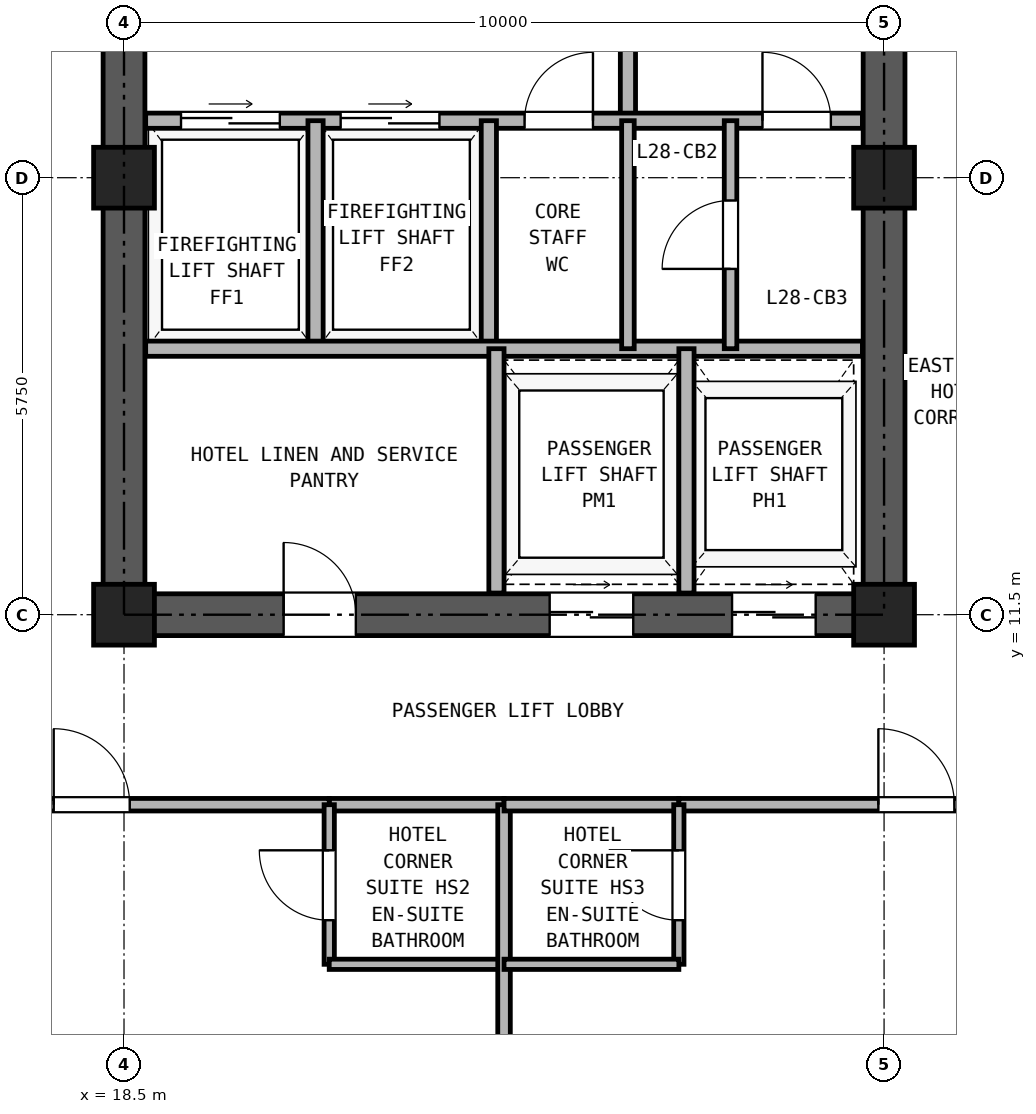
"""IFC4 building model, lengths in metres.
Left out: names, types, materials, properties, quantities, classifications, styles, units other than length and angle.
Written with IfcOpenShell. Run it as: python <this file> out.ifc"""

import sys

from ifc_helpers import new_model, si_unit, direction, frame, frame_2d, origin, origin_2d, place, context, subcontext, project, spatial, rectangle, hollow_rectangle, extrude, source, transform, mapped, element, fill, save


model = new_model("IFC4")
c1 = context("Model", 3, precision=1e-05, world=origin(), true_north=direction((0.0, 1.0)))
c2 = subcontext(c1, "Body", "Model", "MODEL_VIEW")
j1 = project(units=[si_unit("LENGTHUNIT", "METRE"), si_unit("PLANEANGLEUNIT", "RADIAN")], contexts=[c1])
p1 = place(None, origin())
s1 = spatial("IfcSite", under=j1, at=p1, CompositionType="ELEMENT")
p2 = place(p1, origin())
s2 = spatial("IfcBuilding", under=s1, at=p2, CompositionType="ELEMENT")
p3 = place(p2, frame((0.0, 0.0, 105.5)))
s3 = spatial("IfcBuildingStorey", under=s2, at=p3, CompositionType="ELEMENT", Elevation=105.5)
m1 = source(origin(), c2, "Body", "SweptSolid", [
    extrude(hollow_rectangle(XDim=0.8, YDim=0.8, WallThickness=0.045, at=origin_2d()), origin(), (0.0, 0.0, 1.0), 2.95),
])
for number, where, z_axis, x_axis in (
    (1, (18.5, 11.5, 0.0), (0.0, 0.0, 1.0), (1.0, 0.0, 0.0)),
    (2, (18.5, 17.25, 0.0), (0.0, 0.0, 1.0), (1.0, 0.0, 0.0)),
    (3, (28.5, 11.5, 0.0), (0.0, 0.0, 1.0), (1.0, 0.0, 0.0)),
    (4, (28.5, 17.25, 0.0), (0.0, 0.0, 1.0), (1.0, 0.0, 0.0)),
):
    element("IfcColumn", number, at=place(p3, frame(where, z_axis=z_axis, x_axis=x_axis)), inside=s3, PredefinedType="COLUMN", context=c2, shape_type="MappedRepresentation", body=[
        mapped(m1, transform((0.0, 0.0, 0.0), x_axis=(1.0, 0.0, 0.0), y_axis=(0.0, 1.0, 0.0), z_axis=(0.0, 0.0, 1.0), scale=1.0)),
    ])
p4 = place(p3, frame((18.225, 11.5, 0.0), z_axis=(0.0, 0.0, 1.0), x_axis=(1.0, 0.0, 0.0)))
e5 = element("IfcWall", 5, at=p4, inside=s3, PredefinedType="SHEAR", context=c2, shape_type="SweptSolid", body=[
    extrude(rectangle(XDim=10.55, YDim=0.55, at=frame_2d((5.275, 0.0))), origin(), (0.0, 0.0, 1.0), 2.95),
])
p5 = place(p4, frame((2.375, 0.0, 0.0)))
e6 = element("IfcOpeningElement", 6, at=p5, cuts=e5, PredefinedType="OPENING", context=c2, shape_type="SweptSolid", body=[
    extrude(rectangle(XDim=0.95, YDim=2.15, at=frame_2d((0.475, 1.075))), frame((0.0, 0.285, 0.0), z_axis=(0.0, -1.0, 0.0), x_axis=(1.0, 0.0, 0.0)), (0.0, 0.0, 1.0), 0.57),
])
p6 = place(p4, frame((5.875, 0.0, 0.0)))
e7 = element("IfcOpeningElement", 7, at=p6, cuts=e5, PredefinedType="OPENING", context=c2, shape_type="SweptSolid", body=[
    extrude(rectangle(XDim=1.1, YDim=2.25, at=frame_2d((0.55, 1.125))), frame((0.0, 0.285, 0.0), z_axis=(0.0, -1.0, 0.0), x_axis=(1.0, 0.0, 0.0)), (0.0, 0.0, 1.0), 0.57),
])
p7 = place(p4, frame((8.275, 0.0, 0.0)))
e8 = element("IfcOpeningElement", 8, at=p7, cuts=e5, PredefinedType="OPENING", context=c2, shape_type="SweptSolid", body=[
    extrude(rectangle(XDim=1.1, YDim=2.25, at=frame_2d((0.55, 1.125))), frame((0.0, 0.285, 0.0), z_axis=(0.0, -1.0, 0.0), x_axis=(1.0, 0.0, 0.0)), (0.0, 0.0, 1.0), 0.57),
])
p8 = place(p3, frame((18.5, 11.775, 0.0), z_axis=(0.0, 0.0, 1.0), x_axis=(0.0, 1.0, 0.0)))
e9 = element("IfcWall", 9, at=p8, inside=s3, PredefinedType="SHEAR", context=c2, shape_type="SweptSolid", body=[
    extrude(rectangle(XDim=16.7, YDim=0.55, at=frame_2d((8.35, 0.0))), origin(), (0.0, 0.0, 1.0), 2.95),
])
p9 = place(p8, frame((7.375, 0.0, 0.0)))
e10 = element("IfcOpeningElement", 10, at=p9, cuts=e9, PredefinedType="OPENING", context=c2, shape_type="SweptSolid", body=[
    extrude(rectangle(XDim=1.15, YDim=2.2, at=frame_2d((0.575, 1.1))), frame((0.0, 0.285, 0.0), z_axis=(0.0, -1.0, 0.0), x_axis=(1.0, 0.0, 0.0)), (0.0, 0.0, 1.0), 0.57),
])
p10 = place(p3, frame((28.5, 11.775, 0.0), z_axis=(0.0, 0.0, 1.0), x_axis=(0.0, 1.0, 0.0)))
e11 = element("IfcWall", 11, at=p10, inside=s3, PredefinedType="SHEAR", context=c2, shape_type="SweptSolid", body=[
    extrude(rectangle(XDim=16.7, YDim=0.55, at=frame_2d((8.35, 0.0))), origin(), (0.0, 0.0, 1.0), 2.95),
])
p11 = place(p10, frame((7.375, 0.0, 0.0)))
e12 = element("IfcOpeningElement", 12, at=p11, cuts=e11, PredefinedType="OPENING", context=c2, shape_type="SweptSolid", body=[
    extrude(rectangle(XDim=1.15, YDim=2.2, at=frame_2d((0.575, 1.1))), frame((0.0, 0.285, 0.0), z_axis=(0.0, -1.0, 0.0), x_axis=(1.0, 0.0, 0.0)), (0.0, 0.0, 1.0), 0.57),
])
p12 = place(p3, frame((25.13, 18.0, 0.0), z_axis=(0.0, 0.0, 1.0), x_axis=(0.0, 1.0, 0.0)))
e13 = element("IfcWall", 13, at=p12, inside=s3, PredefinedType="PARTITIONING", context=c2, shape_type="SweptSolid", body=[
    extrude(rectangle(XDim=3.39, YDim=0.2, at=frame_2d((1.695, 0.0))), origin(), (0.0, 0.0, 1.0), 2.95),
])
p13 = place(p12, frame((1.1, 0.0, 0.0)))
e14 = element("IfcOpeningElement", 14, at=p13, cuts=e13, PredefinedType="OPENING", context=c2, shape_type="SweptSolid", body=[
    extrude(rectangle(XDim=1.15, YDim=2.2, at=frame_2d((0.575, 1.1))), frame((0.0, 0.11, 0.0), z_axis=(0.0, -1.0, 0.0), x_axis=(1.0, 0.0, 0.0)), (0.0, 0.0, 1.0), 0.22),
])
p14 = place(p3, frame((18.785, 18.0, 0.0), z_axis=(0.0, 0.0, 1.0), x_axis=(1.0, 0.0, 0.0)))
e15 = element("IfcWall", 15, at=p14, inside=s3, PredefinedType="PARTITIONING", context=c2, shape_type="SweptSolid", body=[
    extrude(rectangle(XDim=9.43, YDim=0.2, at=frame_2d((4.715, 0.0))), origin(), (0.0, 0.0, 1.0), 2.95),
])
p15 = place(p14, frame((0.465, 0.0, 0.0)))
e16 = element("IfcOpeningElement", 16, at=p15, cuts=e15, PredefinedType="OPENING", context=c2, shape_type="SweptSolid", body=[
    extrude(rectangle(XDim=1.3, YDim=2.3, at=frame_2d((0.65, 1.15))), frame((0.0, 0.11, 0.0), z_axis=(0.0, -1.0, 0.0), x_axis=(1.0, 0.0, 0.0)), (0.0, 0.0, 1.0), 0.22),
])
p16 = place(p14, frame((2.565, 0.0, 0.0)))
e17 = element("IfcOpeningElement", 17, at=p16, cuts=e15, PredefinedType="OPENING", context=c2, shape_type="SweptSolid", body=[
    extrude(rectangle(XDim=1.3, YDim=2.3, at=frame_2d((0.65, 1.15))), frame((0.0, 0.11, 0.0), z_axis=(0.0, -1.0, 0.0), x_axis=(1.0, 0.0, 0.0)), (0.0, 0.0, 1.0), 0.22),
])
p17 = place(p14, frame((4.985, 0.0, 0.0)))
e18 = element("IfcOpeningElement", 18, at=p17, cuts=e15, PredefinedType="OPENING", context=c2, shape_type="SweptSolid", body=[
    extrude(rectangle(XDim=0.9, YDim=2.05, at=frame_2d((0.45, 1.025))), frame((0.0, 0.11, 0.0), z_axis=(0.0, -1.0, 0.0), x_axis=(1.0, 0.0, 0.0)), (0.0, 0.0, 1.0), 0.22),
])
p18 = place(p14, frame((8.115, 0.0, 0.0)))
e19 = element("IfcOpeningElement", 19, at=p18, cuts=e15, PredefinedType="OPENING", context=c2, shape_type="SweptSolid", body=[
    extrude(rectangle(XDim=0.9, YDim=2.05, at=frame_2d((0.45, 1.025))), frame((0.0, 0.11, 0.0), z_axis=(0.0, -1.0, 0.0), x_axis=(1.0, 0.0, 0.0)), (0.0, 0.0, 1.0), 0.22),
])
for number, where, z_axis, x_axis in (
    (20, (21.02, 15.0, 0.0), (0.0, 0.0, 1.0), (0.0, 1.0, 0.0)),
    (21, (23.3, 15.0, 0.0), (0.0, 0.0, 1.0), (0.0, 1.0, 0.0)),
):
    element("IfcWall", number, at=place(p3, frame(where, z_axis=z_axis, x_axis=x_axis)), inside=s3, PredefinedType="PARTITIONING", context=c2, shape_type="SweptSolid", body=[
        extrude(rectangle(XDim=3.0, YDim=0.2, at=frame_2d((1.5, 0.0))), origin(), (0.0, 0.0, 1.0), 2.95),
    ])
p19 = place(p3, frame((18.785, 15.0, 0.0), z_axis=(0.0, 0.0, 1.0), x_axis=(1.0, 0.0, 0.0)))
e22 = element("IfcWall", 22, at=p19, inside=s3, PredefinedType="PARTITIONING", context=c2, shape_type="SweptSolid", body=[
    extrude(rectangle(XDim=9.43, YDim=0.2, at=frame_2d((4.715, 0.0))), origin(), (0.0, 0.0, 1.0), 2.95),
])
p20 = place(p3, frame((25.13, 15.0, 0.0), z_axis=(0.0, 0.0, 1.0), x_axis=(0.0, 1.0, 0.0)))
e23 = element("IfcWall", 23, at=p20, inside=s3, PredefinedType="PARTITIONING", context=c2, shape_type="SweptSolid", body=[
    extrude(rectangle(XDim=3.0, YDim=0.165, at=frame_2d((1.5, 0.0))), origin(), (0.0, 0.0, 1.0), 2.95),
])
p21 = place(p3, frame((26.48, 15.0, 0.0), z_axis=(0.0, 0.0, 1.0), x_axis=(0.0, 1.0, 0.0)))
e24 = element("IfcWall", 24, at=p21, inside=s3, PredefinedType="PARTITIONING", context=c2, shape_type="SweptSolid", body=[
    extrude(rectangle(XDim=3.0, YDim=0.165, at=frame_2d((1.5, 0.0))), origin(), (0.0, 0.0, 1.0), 2.95),
])
p22 = place(p21, frame((1.05, 0.0, 0.0)))
e25 = element("IfcOpeningElement", 25, at=p22, cuts=e24, PredefinedType="OPENING", context=c2, shape_type="SweptSolid", body=[
    extrude(rectangle(XDim=0.9, YDim=2.05, at=frame_2d((0.45, 1.025))), frame((0.0, 0.093, 0.0), z_axis=(0.0, -1.0, 0.0), x_axis=(1.0, 0.0, 0.0)), (0.0, 0.0, 1.0), 0.185),
])
for number, where, z_axis, x_axis in (
    (26, (23.4, 11.785, 0.0), (0.0, 0.0, 1.0), (0.0, 1.0, 0.0)),
    (27, (25.9, 11.785, 0.0), (0.0, 0.0, 1.0), (0.0, 1.0, 0.0)),
):
    element("IfcWall", number, at=place(p3, frame(where, z_axis=z_axis, x_axis=x_axis)), inside=s3, PredefinedType="PARTITIONING", context=c2, shape_type="SweptSolid", body=[
        extrude(rectangle(XDim=3.215, YDim=0.2, at=frame_2d((1.607, 0.0))), origin(), (0.0, 0.0, 1.0), 2.95),
    ])
p23 = place(p3, frame((21.2, 9.0, 0.0), z_axis=(0.0, 0.0, 1.0), x_axis=(1.0, 0.0, 0.0)))
e28 = element("IfcWall", 28, at=p23, inside=s3, PredefinedType="PARTITIONING", context=c2, shape_type="SweptSolid", body=[
    extrude(rectangle(XDim=2.3, YDim=0.165, at=frame_2d((1.15, 0.0))), origin(), (0.0, 0.0, 1.0), 2.95),
])
p24 = place(p3, frame((14.95, 9.0, 0.0), z_axis=(0.0, 0.0, 1.0), x_axis=(1.0, 0.0, 0.0)))
e29 = element("IfcWall", 29, at=p24, inside=s3, PredefinedType="PARTITIONING", context=c2, shape_type="SweptSolid", body=[
    extrude(rectangle(XDim=6.25, YDim=0.165, at=frame_2d((3.125, 0.0))), origin(), (0.0, 0.0, 1.0), 2.95),
])
p25 = place(p24, frame((2.625, 0.0, 0.0)))
e30 = element("IfcOpeningElement", 30, at=p25, cuts=e29, PredefinedType="OPENING", context=c2, shape_type="SweptSolid", body=[
    extrude(rectangle(XDim=1.0, YDim=2.15, at=frame_2d((0.5, 1.075))), frame((0.0, 0.093, 0.0), z_axis=(0.0, -1.0, 0.0), x_axis=(1.0, 0.0, 0.0)), (0.0, 0.0, 1.0), 0.185),
])
p26 = place(p3, frame((21.2, 6.9, 0.0), z_axis=(0.0, 0.0, 1.0), x_axis=(0.0, 1.0, 0.0)))
e31 = element("IfcWall", 31, at=p26, inside=s3, PredefinedType="PARTITIONING", context=c2, shape_type="SweptSolid", body=[
    extrude(rectangle(XDim=2.1, YDim=0.135, at=frame_2d((1.05, 0.0))), origin(), (0.0, 0.0, 1.0), 2.95),
])
p27 = place(p26, frame((0.58, 0.0, 0.0)))
e32 = element("IfcOpeningElement", 32, at=p27, cuts=e31, PredefinedType="OPENING", context=c2, shape_type="SweptSolid", body=[
    extrude(rectangle(XDim=0.92, YDim=2.1, at=frame_2d((0.46, 1.05))), frame((0.0, 0.077, 0.0), z_axis=(0.0, -1.0, 0.0), x_axis=(1.0, 0.0, 0.0)), (0.0, 0.0, 1.0), 0.155),
])
p28 = place(p3, frame((21.2, 6.9, 0.0), z_axis=(0.0, 0.0, 1.0), x_axis=(1.0, 0.0, 0.0)))
e33 = element("IfcWall", 33, at=p28, inside=s3, PredefinedType="PARTITIONING", context=c2, shape_type="SweptSolid", body=[
    extrude(rectangle(XDim=2.3, YDim=0.135, at=frame_2d((1.15, 0.0))), origin(), (0.0, 0.0, 1.0), 2.95),
])
p29 = place(p3, frame((23.5, 0.16, 0.0), z_axis=(0.0, 0.0, 1.0), x_axis=(0.0, 1.0, 0.0)))
e34 = element("IfcWall", 34, at=p29, inside=s3, PredefinedType="PARTITIONING", context=c2, shape_type="SweptSolid", body=[
    extrude(rectangle(XDim=8.84, YDim=0.165, at=frame_2d((4.42, 0.0))), origin(), (0.0, 0.0, 1.0), 2.95),
])
p30 = place(p3, frame((23.5, 9.0, 0.0), z_axis=(0.0, 0.0, 1.0), x_axis=(1.0, 0.0, 0.0)))
e35 = element("IfcWall", 35, at=p30, inside=s3, PredefinedType="PARTITIONING", context=c2, shape_type="SweptSolid", body=[
    extrude(rectangle(XDim=2.3, YDim=0.165, at=frame_2d((1.15, 0.0))), origin(), (0.0, 0.0, 1.0), 2.95),
])
p31 = place(p3, frame((25.8, 9.0, 0.0), z_axis=(0.0, 0.0, 1.0), x_axis=(1.0, 0.0, 0.0)))
e36 = element("IfcWall", 36, at=p31, inside=s3, PredefinedType="PARTITIONING", context=c2, shape_type="SweptSolid", body=[
    extrude(rectangle(XDim=6.25, YDim=0.165, at=frame_2d((3.125, 0.0))), origin(), (0.0, 0.0, 1.0), 2.95),
])
p32 = place(p31, frame((2.625, 0.0, 0.0)))
e37 = element("IfcOpeningElement", 37, at=p32, cuts=e36, PredefinedType="OPENING", context=c2, shape_type="SweptSolid", body=[
    extrude(rectangle(XDim=1.0, YDim=2.15, at=frame_2d((0.5, 1.075))), frame((0.0, 0.093, 0.0), z_axis=(0.0, -1.0, 0.0), x_axis=(1.0, 0.0, 0.0)), (0.0, 0.0, 1.0), 0.185),
])
p33 = place(p3, frame((25.8, 6.9, 0.0), z_axis=(0.0, 0.0, 1.0), x_axis=(0.0, 1.0, 0.0)))
e38 = element("IfcWall", 38, at=p33, inside=s3, PredefinedType="PARTITIONING", context=c2, shape_type="SweptSolid", body=[
    extrude(rectangle(XDim=2.1, YDim=0.135, at=frame_2d((1.05, 0.0))), origin(), (0.0, 0.0, 1.0), 2.95),
])
p34 = place(p33, frame((0.58, 0.0, 0.0)))
e39 = element("IfcOpeningElement", 39, at=p34, cuts=e38, PredefinedType="OPENING", context=c2, shape_type="SweptSolid", body=[
    extrude(rectangle(XDim=0.92, YDim=2.1, at=frame_2d((0.46, 1.05))), frame((0.0, 0.077, 0.0), z_axis=(0.0, -1.0, 0.0), x_axis=(1.0, 0.0, 0.0)), (0.0, 0.0, 1.0), 0.155),
])
p35 = place(p3, frame((23.5, 6.9, 0.0), z_axis=(0.0, 0.0, 1.0), x_axis=(1.0, 0.0, 0.0)))
e40 = element("IfcWall", 40, at=p35, inside=s3, PredefinedType="PARTITIONING", context=c2, shape_type="SweptSolid", body=[
    extrude(rectangle(XDim=2.3, YDim=0.135, at=frame_2d((1.15, 0.0))), origin(), (0.0, 0.0, 1.0), 2.95),
])
p36 = place(p15, origin())
e41 = element("IfcDoor", 41, at=p36, inside=s3, OperationType="DOUBLE_DOOR_SLIDING", PredefinedType="DOOR", context=c2, shape_type="SweptSolid", body=[
    extrude(rectangle(XDim=1.3, YDim=2.3, at=frame_2d((0.65, 1.15))), frame((0.0, 0.025, 0.0), z_axis=(0.0, -1.0, 0.0), x_axis=(1.0, 0.0, 0.0)), (0.0, 0.0, 1.0), 0.05),
])
fill(e16, e41)
p37 = place(p16, origin())
e42 = element("IfcDoor", 42, at=p37, inside=s3, OperationType="DOUBLE_DOOR_SLIDING", PredefinedType="DOOR", context=c2, shape_type="SweptSolid", body=[
    extrude(rectangle(XDim=1.3, YDim=2.3, at=frame_2d((0.65, 1.15))), frame((0.0, 0.025, 0.0), z_axis=(0.0, -1.0, 0.0), x_axis=(1.0, 0.0, 0.0)), (0.0, 0.0, 1.0), 0.05),
])
fill(e17, e42)
p38 = place(p17, frame((0.9, 0.0, 0.0), z_axis=(0.0, 0.0, 1.0), x_axis=(-1.0, 0.0, 0.0)))
e43 = element("IfcDoor", 43, at=p38, inside=s3, OperationType="SINGLE_SWING_RIGHT", PredefinedType="DOOR", context=c2, shape_type="SweptSolid", body=[
    extrude(rectangle(XDim=0.9, YDim=2.05, at=frame_2d((0.45, 1.025))), frame((0.0, 0.025, 0.0), z_axis=(0.0, -1.0, 0.0), x_axis=(1.0, 0.0, 0.0)), (0.0, 0.0, 1.0), 0.05),
])
fill(e18, e43)
p39 = place(p22, origin())
e44 = element("IfcDoor", 44, at=p39, inside=s3, OperationType="SINGLE_SWING_LEFT", PredefinedType="DOOR", context=c2, shape_type="SweptSolid", body=[
    extrude(rectangle(XDim=0.9, YDim=2.05, at=frame_2d((0.45, 1.025))), frame((0.0, 0.025, 0.0), z_axis=(0.0, -1.0, 0.0), x_axis=(1.0, 0.0, 0.0)), (0.0, 0.0, 1.0), 0.05),
])
fill(e25, e44)
p40 = place(p18, frame((0.9, 0.0, 0.0), z_axis=(0.0, 0.0, 1.0), x_axis=(-1.0, 0.0, 0.0)))
e45 = element("IfcDoor", 45, at=p40, inside=s3, OperationType="SINGLE_SWING_LEFT", PredefinedType="DOOR", context=c2, shape_type="SweptSolid", body=[
    extrude(rectangle(XDim=0.9, YDim=2.05, at=frame_2d((0.45, 1.025))), frame((0.0, 0.025, 0.0), z_axis=(0.0, -1.0, 0.0), x_axis=(1.0, 0.0, 0.0)), (0.0, 0.0, 1.0), 0.05),
])
fill(e19, e45)
p41 = place(p5, frame((0.95, 0.0, 0.0), z_axis=(0.0, 0.0, 1.0), x_axis=(-1.0, 0.0, 0.0)))
e46 = element("IfcDoor", 46, at=p41, inside=s3, OperationType="SINGLE_SWING_LEFT", PredefinedType="DOOR", context=c2, shape_type="SweptSolid", body=[
    extrude(rectangle(XDim=0.95, YDim=2.15, at=frame_2d((0.475, 1.075))), frame((0.0, 0.025, 0.0), z_axis=(0.0, -1.0, 0.0), x_axis=(1.0, 0.0, 0.0)), (0.0, 0.0, 1.0), 0.05),
])
fill(e6, e46)
p42 = place(p6, frame((1.1, 0.0, 0.0), z_axis=(0.0, 0.0, 1.0), x_axis=(-1.0, 0.0, 0.0)))
e47 = element("IfcDoor", 47, at=p42, inside=s3, OperationType="DOUBLE_DOOR_SLIDING", PredefinedType="DOOR", context=c2, shape_type="SweptSolid", body=[
    extrude(rectangle(XDim=1.1, YDim=2.25, at=frame_2d((0.55, 1.125))), frame((0.0, 0.025, 0.0), z_axis=(0.0, -1.0, 0.0), x_axis=(1.0, 0.0, 0.0)), (0.0, 0.0, 1.0), 0.05),
])
fill(e7, e47)
p43 = place(p7, frame((1.1, 0.0, 0.0), z_axis=(0.0, 0.0, 1.0), x_axis=(-1.0, 0.0, 0.0)))
e48 = element("IfcDoor", 48, at=p43, inside=s3, OperationType="DOUBLE_DOOR_SLIDING", PredefinedType="DOOR", context=c2, shape_type="SweptSolid", body=[
    extrude(rectangle(XDim=1.1, YDim=2.25, at=frame_2d((0.55, 1.125))), frame((0.0, 0.025, 0.0), z_axis=(0.0, -1.0, 0.0), x_axis=(1.0, 0.0, 0.0)), (0.0, 0.0, 1.0), 0.05),
])
fill(e8, e48)
p44 = place(p27, origin())
e49 = element("IfcDoor", 49, at=p44, inside=s3, OperationType="SINGLE_SWING_RIGHT", PredefinedType="DOOR", context=c2, shape_type="SweptSolid", body=[
    extrude(rectangle(XDim=0.92, YDim=2.1, at=frame_2d((0.46, 1.05))), frame((0.0, 0.025, 0.0), z_axis=(0.0, -1.0, 0.0), x_axis=(1.0, 0.0, 0.0)), (0.0, 0.0, 1.0), 0.05),
])
fill(e32, e49)
p45 = place(p25, frame((1.0, 0.0, 0.0), z_axis=(0.0, 0.0, 1.0), x_axis=(-1.0, 0.0, 0.0)))
e50 = element("IfcDoor", 50, at=p45, inside=s3, OperationType="SINGLE_SWING_LEFT", PredefinedType="DOOR", context=c2, shape_type="SweptSolid", body=[
    extrude(rectangle(XDim=1.0, YDim=2.15, at=frame_2d((0.5, 1.075))), frame((0.0, 0.025, 0.0), z_axis=(0.0, -1.0, 0.0), x_axis=(1.0, 0.0, 0.0)), (0.0, 0.0, 1.0), 0.05),
])
fill(e30, e50)
p46 = place(p34, frame((0.92, 0.0, 0.0), z_axis=(0.0, 0.0, 1.0), x_axis=(-1.0, 0.0, 0.0)))
e51 = element("IfcDoor", 51, at=p46, inside=s3, OperationType="SINGLE_SWING_RIGHT", PredefinedType="DOOR", context=c2, shape_type="SweptSolid", body=[
    extrude(rectangle(XDim=0.92, YDim=2.1, at=frame_2d((0.46, 1.05))), frame((0.0, 0.025, 0.0), z_axis=(0.0, -1.0, 0.0), x_axis=(1.0, 0.0, 0.0)), (0.0, 0.0, 1.0), 0.05),
])
fill(e39, e51)
p47 = place(p32, frame((1.0, 0.0, 0.0), z_axis=(0.0, 0.0, 1.0), x_axis=(-1.0, 0.0, 0.0)))
e52 = element("IfcDoor", 52, at=p47, inside=s3, OperationType="SINGLE_SWING_LEFT", PredefinedType="DOOR", context=c2, shape_type="SweptSolid", body=[
    extrude(rectangle(XDim=1.0, YDim=2.15, at=frame_2d((0.5, 1.075))), frame((0.0, 0.025, 0.0), z_axis=(0.0, -1.0, 0.0), x_axis=(1.0, 0.0, 0.0)), (0.0, 0.0, 1.0), 0.05),
])
fill(e37, e52)
save(model, sys.argv[1])
